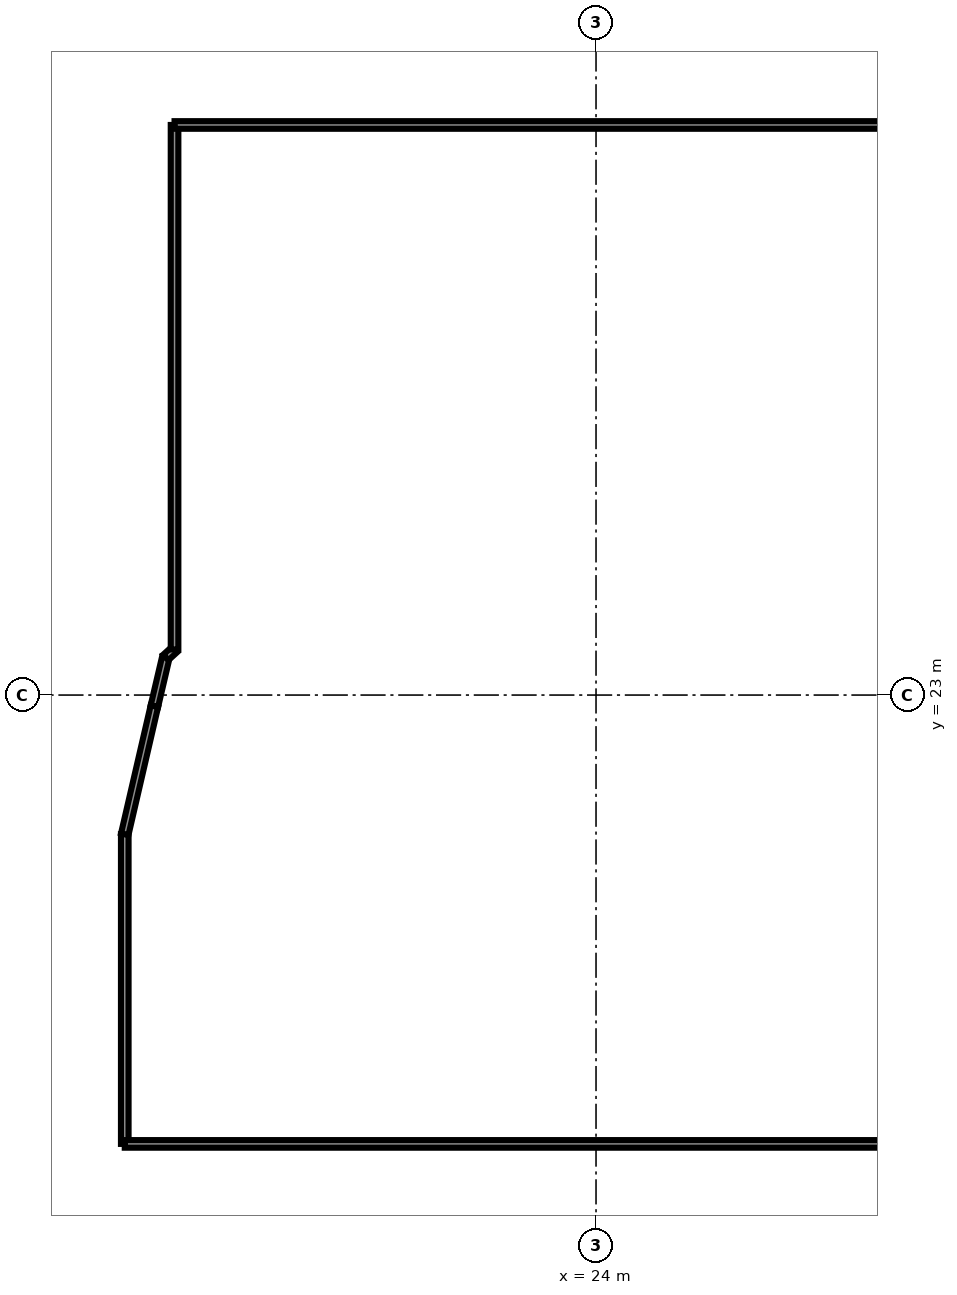
"""IFC4 building model, lengths in metres.
Left out: names, types, materials, properties, quantities, classifications, styles, units other than length and angle.
Written with IfcOpenShell. Run it as: python <this file> out.ifc"""

import sys

from ifc_helpers import new_model, si_unit, direction, frame, frame_2d, origin, origin_2d, place, context, subcontext, project, spatial, rectangle, i_section, extrude, element, fill, save


model = new_model("IFC4")
c1 = context("Model", 3, precision=1e-05, world=origin(), true_north=direction((0.0, 1.0)))
c2 = subcontext(c1, "Body", "Model", "MODEL_VIEW")
j1 = project(units=[si_unit("LENGTHUNIT", "METRE"), si_unit("PLANEANGLEUNIT", "RADIAN")], contexts=[c1])
p1 = place(None, origin())
s1 = spatial("IfcSite", under=j1, at=p1, CompositionType="ELEMENT")
p2 = place(p1, origin())
s2 = spatial("IfcBuilding", under=s1, at=p2, CompositionType="ELEMENT")
p3 = place(p2, frame((0.0, 0.0, 96.7)))
s3 = spatial("IfcBuildingStorey", under=s2, at=p3, CompositionType="ELEMENT", Elevation=96.7)
p4 = place(p3, frame((24.0, 23.0, 0.0), z_axis=(0.0, 0.0, 1.0), x_axis=(1.0, 0.0, 0.0)))
e1 = element("IfcColumn", 1, at=p4, inside=s3, PredefinedType="COLUMN", context=c2, shape_type="SweptSolid", body=[
    extrude(i_section(OverallWidth=0.306, OverallDepth=0.524, WebThickness=0.021, FlangeThickness=0.04, FilletRadius=0.027, at=origin_2d()), origin(), (0.0, 0.0, 1.0), 3.6),
])
p5 = place(p3, frame((17.8, 17.095, 0.0), z_axis=(0.0, 0.0, 1.0), x_axis=(0.0, 1.0, 0.0)))
e2 = element("IfcWall", 2, at=p5, inside=s3, PredefinedType="PARTITIONING", context=c2, shape_type="SweptSolid", body=[
    extrude(rectangle(XDim=4.075, YDim=0.1, at=frame_2d((2.038, 0.0))), origin(), (0.0, 0.0, 1.0), 3.2),
])
p6 = place(p3, frame((17.8, 17.095, 0.0), z_axis=(0.0, 0.0, 1.0), x_axis=(1.0, 0.0, 0.0)))
e3 = element("IfcWall", 3, at=p6, inside=s3, PredefinedType="PARTITIONING", context=c2, shape_type="SweptSolid", body=[
    extrude(rectangle(XDim=67.8, YDim=0.1, at=frame_2d((33.9, 0.0))), origin(), (0.0, 0.0, 1.0), 3.2),
])
p7 = place(p6, frame((12.0, 0.0, 0.0)))
e4 = element("IfcOpeningElement", 4, at=p7, cuts=e3, PredefinedType="OPENING", context=c2, shape_type="SweptSolid", body=[
    extrude(rectangle(XDim=1.0, YDim=2.1, at=frame_2d((0.5, 1.05))), frame((0.0, 0.06, 0.0), z_axis=(0.0, -1.0, 0.0), x_axis=(1.0, 0.0, 0.0)), (0.0, 0.0, 1.0), 0.12),
])
p8 = place(p6, frame((48.5, 0.0, 0.0)))
e5 = element("IfcOpeningElement", 5, at=p8, cuts=e3, PredefinedType="OPENING", context=c2, shape_type="SweptSolid", body=[
    extrude(rectangle(XDim=1.8, YDim=2.1, at=frame_2d((0.9, 1.05))), frame((0.0, 0.06, 0.0), z_axis=(0.0, -1.0, 0.0), x_axis=(1.0, 0.0, 0.0)), (0.0, 0.0, 1.0), 0.12),
])
p9 = place(p6, frame((56.825, 0.0, 0.0)))
e6 = element("IfcOpeningElement", 6, at=p9, cuts=e3, PredefinedType="OPENING", context=c2, shape_type="SweptSolid", body=[
    extrude(rectangle(XDim=1.0, YDim=2.1, at=frame_2d((0.5, 1.05))), frame((0.0, 0.06, 0.0), z_axis=(0.0, -1.0, 0.0), x_axis=(1.0, 0.0, 0.0)), (0.0, 0.0, 1.0), 0.12),
])
p10 = place(p6, frame((60.825, 0.0, 0.0)))
e7 = element("IfcOpeningElement", 7, at=p10, cuts=e3, PredefinedType="OPENING", context=c2, shape_type="SweptSolid", body=[
    extrude(rectangle(XDim=1.0, YDim=2.1, at=frame_2d((0.5, 1.05))), frame((0.0, 0.06, 0.0), z_axis=(0.0, -1.0, 0.0), x_axis=(1.0, 0.0, 0.0)), (0.0, 0.0, 1.0), 0.12),
])
p11 = place(p6, frame((64.981, 0.0, 0.0)))
e8 = element("IfcOpeningElement", 8, at=p11, cuts=e3, PredefinedType="OPENING", context=c2, shape_type="SweptSolid", body=[
    extrude(rectangle(XDim=1.0, YDim=2.1, at=frame_2d((0.5, 1.05))), frame((0.0, 0.06, 0.0), z_axis=(0.0, -1.0, 0.0), x_axis=(1.0, 0.0, 0.0)), (0.0, 0.0, 1.0), 0.12),
])
p12 = place(p3, frame((17.8, 21.17, 0.0), z_axis=(0.0, 0.0, 1.0), x_axis=(0.225426, 0.974258, 0.0)))
e9 = element("IfcWall", 9, at=p12, inside=s3, PredefinedType="PARTITIONING", context=c2, shape_type="SweptSolid", body=[
    extrude(rectangle(XDim=1.729, YDim=0.1, at=frame_2d((0.865, 0.0))), origin(), (0.0, 0.0, 1.0), 3.2),
])
p13 = place(p3, frame((18.19, 22.855, 0.0), z_axis=(0.0, 0.0, 1.0), x_axis=(0.228356, 0.973576, 0.0)))
e10 = element("IfcWall", 10, at=p13, inside=s3, PredefinedType="PARTITIONING", context=c2, shape_type="SweptSolid", body=[
    extrude(rectangle(XDim=0.657, YDim=0.1, at=frame_2d((0.329, 0.0))), origin(), (0.0, 0.0, 1.0), 3.2),
])
p14 = place(p3, frame((18.34, 23.495, 0.0), z_axis=(0.0, 0.0, 1.0), x_axis=(0.738517, 0.67423, 0.0)))
e11 = element("IfcWall", 11, at=p14, inside=s3, PredefinedType="PARTITIONING", context=c2, shape_type="SweptSolid", body=[
    extrude(rectangle(XDim=0.156, YDim=0.1, at=frame_2d((0.078, 0.0))), origin(), (0.0, 0.0, 1.0), 3.2),
])
p15 = place(p3, frame((18.455, 23.6, 0.0), z_axis=(0.0, 0.0, 1.0), x_axis=(0.0, 1.0, 0.0)))
e12 = element("IfcWall", 12, at=p15, inside=s3, PredefinedType="PARTITIONING", context=c2, shape_type="SweptSolid", body=[
    extrude(rectangle(XDim=6.9, YDim=0.1, at=frame_2d((3.45, 0.0))), origin(), (0.0, 0.0, 1.0), 3.2),
])
p16 = place(p15, frame((3.882, 0.0, 0.0)))
e13 = element("IfcOpeningElement", 13, at=p16, cuts=e12, PredefinedType="OPENING", context=c2, shape_type="SweptSolid", body=[
    extrude(rectangle(XDim=1.0, YDim=2.1, at=frame_2d((0.5, 1.05))), frame((0.0, 0.06, 0.0), z_axis=(0.0, -1.0, 0.0), x_axis=(1.0, 0.0, 0.0)), (0.0, 0.0, 1.0), 0.12),
])
p17 = place(p3, frame((18.455, 30.5, 0.0), z_axis=(0.0, 0.0, 1.0), x_axis=(1.0, 0.0, 0.0)))
e14 = element("IfcWall", 14, at=p17, inside=s3, PredefinedType="PARTITIONING", context=c2, shape_type="SweptSolid", body=[
    extrude(rectangle(XDim=18.395, YDim=0.1, at=frame_2d((9.198, 0.0))), origin(), (0.0, 0.0, 1.0), 3.2),
])
p18 = place(p17, frame((16.39, 0.0, 0.0)))
e15 = element("IfcOpeningElement", 15, at=p18, cuts=e14, PredefinedType="OPENING", context=c2, shape_type="SweptSolid", body=[
    extrude(rectangle(XDim=1.0, YDim=2.1, at=frame_2d((0.5, 1.05))), frame((0.0, 0.06, 0.0), z_axis=(0.0, -1.0, 0.0), x_axis=(1.0, 0.0, 0.0)), (0.0, 0.0, 1.0), 0.12),
])
p19 = place(p3, frame((26.75, 17.095, 0.0), z_axis=(0.0, 0.0, 1.0), x_axis=(0.0, 1.0, 0.0)))
e16 = element("IfcWall", 16, at=p19, inside=s3, PredefinedType="PARTITIONING", context=c2, shape_type="SweptSolid", body=[
    extrude(rectangle(XDim=13.405, YDim=0.1, at=frame_2d((6.703, 0.0))), origin(), (0.0, 0.0, 1.0), 3.2),
])
p20 = place(p16, origin())
e17 = element("IfcDoor", 17, at=p20, inside=s3, OperationType="SINGLE_SWING_RIGHT", PredefinedType="DOOR", context=c2, shape_type="SweptSolid", body=[
    extrude(rectangle(XDim=1.0, YDim=2.1, at=frame_2d((0.5, 1.05))), frame((0.0, 0.025, 0.0), z_axis=(0.0, -1.0, 0.0), x_axis=(1.0, 0.0, 0.0)), (0.0, 0.0, 1.0), 0.05),
])
fill(e13, e17)
save(model, sys.argv[1])
